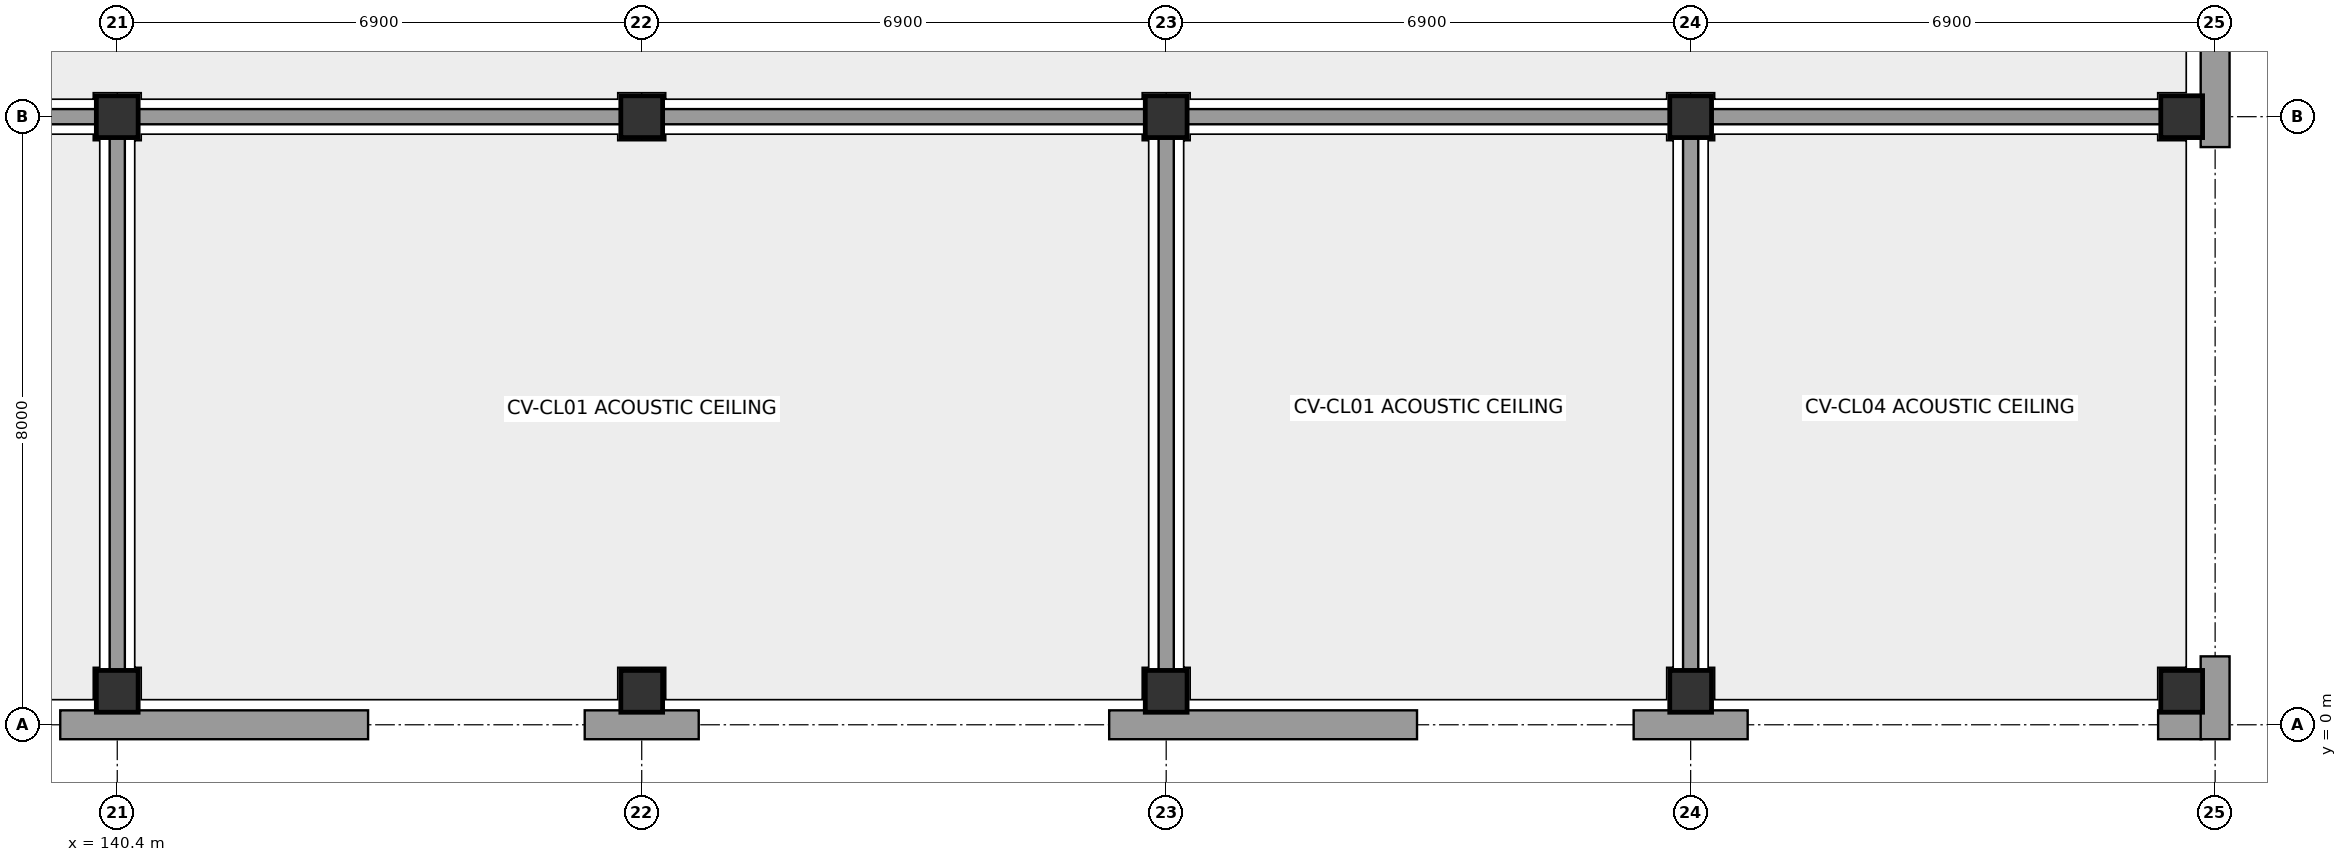
"""IFC4 building model, lengths in metres.
Left out: names, types, materials, properties, quantities, classifications, styles, units other than length and angle.
Written with IfcOpenShell. Run it as: python <this file> out.ifc"""

import sys

from ifc_helpers import new_model, si_unit, direction, frame, frame_2d, origin, origin_with_axes, origin_2d, place, context, subcontext, project, spatial, rectangle, extrude, element, fill, save


model = new_model("IFC4")
c1 = context("Model", 3, precision=1e-05, world=origin(), true_north=direction((0.0, 1.0)))
c2 = subcontext(c1, "Body", "Model", "MODEL_VIEW")
j1 = project(units=[si_unit("LENGTHUNIT", "METRE"), si_unit("PLANEANGLEUNIT", "RADIAN")], contexts=[c1])
p1 = place(None, origin())
s1 = spatial("IfcSite", under=j1, at=p1, CompositionType="ELEMENT")
p2 = place(p1, origin())
s2 = spatial("IfcBuilding", under=s1, at=p2, CompositionType="ELEMENT")
p3 = place(p2, origin())
s3 = spatial("IfcBuildingStorey", under=s2, at=p3, CompositionType="ELEMENT", Elevation=0.0)
for number, where, z_axis, x_axis in (
    (1, (140.4, 0.44, 0.0), (0.0, 0.0, 1.0), (1.0, 0.0, 0.0)),
    (2, (140.4, 8.0, 0.0), (0.0, 0.0, 1.0), (1.0, 0.0, 0.0)),
    (3, (147.3, 0.44, 0.0), (0.0, 0.0, 1.0), (1.0, 0.0, 0.0)),
    (4, (147.3, 8.0, 0.0), (0.0, 0.0, 1.0), (1.0, 0.0, 0.0)),
    (5, (154.2, 0.44, 0.0), (0.0, 0.0, 1.0), (1.0, 0.0, 0.0)),
    (6, (154.2, 8.0, 0.0), (0.0, 0.0, 1.0), (1.0, 0.0, 0.0)),
    (7, (161.1, 0.44, 0.0), (0.0, 0.0, 1.0), (1.0, 0.0, 0.0)),
    (8, (161.1, 8.0, 0.0), (0.0, 0.0, 1.0), (1.0, 0.0, 0.0)),
    (9, (167.56, 0.44, 0.0), (0.0, 0.0, 1.0), (1.0, 0.0, 0.0)),
    (10, (167.56, 8.0, 0.0), (0.0, 0.0, 1.0), (1.0, 0.0, 0.0)),
):
    element("IfcColumn", number, at=place(p3, frame(where, z_axis=z_axis, x_axis=x_axis)), inside=s3, PredefinedType="COLUMN", context=c2, shape_type="SweptSolid", body=[
        extrude(rectangle(XDim=0.55, YDim=0.55, at=origin_2d()), origin(), (0.0, 0.0, 1.0), 4.4),
    ])
p4 = place(p3, frame((139.65, 0.0, 0.0), z_axis=(0.0, 0.0, 1.0), x_axis=(1.0, 0.0, 0.0)))
e11 = element("IfcWall", 11, at=p4, inside=s3, PredefinedType="STANDARD", context=c2, shape_type="SweptSolid", body=[
    extrude(rectangle(XDim=4.05, YDim=0.38, at=frame_2d((2.025, 0.0))), origin(), (0.0, 0.0, 1.0), 4.12),
])
p5 = place(p4, frame((1.9, 0.0, 0.0)))
e12 = element("IfcOpeningElement", 12, at=p5, cuts=e11, PredefinedType="OPENING", context=c2, shape_type="SweptSolid", body=[
    extrude(rectangle(XDim=1.8, YDim=2.4, at=frame_2d((0.9, 1.2))), frame((0.0, 0.202, 0.0), z_axis=(0.0, -1.0, 0.0), x_axis=(1.0, 0.0, 0.0)), (0.0, 0.0, 1.0), 0.404),
])
p6 = place(p3, frame((146.55, 0.0, 0.0), z_axis=(0.0, 0.0, 1.0), x_axis=(1.0, 0.0, 0.0)))
e13 = element("IfcWall", 13, at=p6, inside=s3, PredefinedType="STANDARD", context=c2, shape_type="SweptSolid", body=[
    extrude(rectangle(XDim=1.5, YDim=0.38, at=frame_2d((0.75, 0.0))), origin(), (0.0, 0.0, 1.0), 4.12),
])
p7 = place(p3, frame((153.45, 0.0, 0.0), z_axis=(0.0, 0.0, 1.0), x_axis=(1.0, 0.0, 0.0)))
e14 = element("IfcWall", 14, at=p7, inside=s3, PredefinedType="STANDARD", context=c2, shape_type="SweptSolid", body=[
    extrude(rectangle(XDim=4.05, YDim=0.38, at=frame_2d((2.025, 0.0))), origin(), (0.0, 0.0, 1.0), 4.12),
])
p8 = place(p7, frame((1.9, 0.0, 0.0)))
e15 = element("IfcOpeningElement", 15, at=p8, cuts=e14, PredefinedType="OPENING", context=c2, shape_type="SweptSolid", body=[
    extrude(rectangle(XDim=1.8, YDim=2.4, at=frame_2d((0.9, 1.2))), frame((0.0, 0.202, 0.0), z_axis=(0.0, -1.0, 0.0), x_axis=(1.0, 0.0, 0.0)), (0.0, 0.0, 1.0), 0.404),
])
p9 = place(p3, frame((160.35, 0.0, 0.0), z_axis=(0.0, 0.0, 1.0), x_axis=(1.0, 0.0, 0.0)))
e16 = element("IfcWall", 16, at=p9, inside=s3, PredefinedType="STANDARD", context=c2, shape_type="SweptSolid", body=[
    extrude(rectangle(XDim=1.5, YDim=0.38, at=frame_2d((0.75, 0.0))), origin(), (0.0, 0.0, 1.0), 4.12),
])
p10 = place(p3, frame((167.25, 0.0, 0.0), z_axis=(0.0, 0.0, 1.0), x_axis=(1.0, 0.0, 0.0)))
e17 = element("IfcWall", 17, at=p10, inside=s3, PredefinedType="STANDARD", context=c2, shape_type="SweptSolid", body=[
    extrude(rectangle(XDim=0.57, YDim=0.38, at=frame_2d((0.285, 0.0))), origin(), (0.0, 0.0, 1.0), 4.12),
])
p11 = place(p3, frame((168.0, -0.19, 0.0), z_axis=(0.0, 0.0, 1.0), x_axis=(0.0, 1.0, 0.0)))
e18 = element("IfcWall", 18, at=p11, inside=s3, PredefinedType="STANDARD", context=c2, shape_type="SweptSolid", body=[
    extrude(rectangle(XDim=1.09, YDim=0.38, at=frame_2d((0.545, 0.0))), origin(), (0.0, 0.0, 1.0), 4.12),
])
p12 = place(p3, frame((168.0, 7.6, 0.0), z_axis=(0.0, 0.0, 1.0), x_axis=(0.0, 1.0, 0.0)))
e19 = element("IfcWall", 19, at=p12, inside=s3, PredefinedType="STANDARD", context=c2, shape_type="SweptSolid", body=[
    extrude(rectangle(XDim=3.2, YDim=0.38, at=frame_2d((1.6, 0.0))), origin(), (0.0, 0.0, 1.0), 4.12),
])
p13 = place(p3, frame((126.75, 8.0, 0.0), z_axis=(0.0, 0.0, 1.0), x_axis=(1.0, 0.0, 0.0)))
e20 = element("IfcWall", 20, at=p13, inside=s3, PredefinedType="PARTITIONING", context=c2, shape_type="SweptSolid", body=[
    extrude(rectangle(XDim=13.5, YDim=0.2, at=frame_2d((6.75, 0.0))), origin(), (0.0, 0.0, 1.0), 3.56),
])
p14 = place(p13, frame((2.0, 0.0, 0.0)))
e21 = element("IfcOpeningElement", 21, at=p14, cuts=e20, PredefinedType="OPENING", context=c2, shape_type="SweptSolid", body=[
    extrude(rectangle(XDim=1.0, YDim=2.15, at=frame_2d((0.5, 1.075))), frame((0.0, 0.112, 0.0), z_axis=(0.0, -1.0, 0.0), x_axis=(1.0, 0.0, 0.0)), (0.0, 0.0, 1.0), 0.224),
])
p15 = place(p3, frame((140.4, 0.25, 0.0), z_axis=(0.0, 0.0, 1.0), x_axis=(0.0, 1.0, 0.0)))
e22 = element("IfcWall", 22, at=p15, inside=s3, PredefinedType="PARTITIONING", context=c2, shape_type="SweptSolid", body=[
    extrude(rectangle(XDim=7.6, YDim=0.2, at=frame_2d((3.8, 0.0))), origin(), (0.0, 0.0, 1.0), 4.12),
])
p16 = place(p3, frame((140.55, 8.0, 0.0), z_axis=(0.0, 0.0, 1.0), x_axis=(1.0, 0.0, 0.0)))
e23 = element("IfcWall", 23, at=p16, inside=s3, PredefinedType="PARTITIONING", context=c2, shape_type="SweptSolid", body=[
    extrude(rectangle(XDim=13.5, YDim=0.2, at=frame_2d((6.75, 0.0))), origin(), (0.0, 0.0, 1.0), 3.56),
])
p17 = place(p16, frame((2.0, 0.0, 0.0)))
e24 = element("IfcOpeningElement", 24, at=p17, cuts=e23, PredefinedType="OPENING", context=c2, shape_type="SweptSolid", body=[
    extrude(rectangle(XDim=1.0, YDim=2.15, at=frame_2d((0.5, 1.075))), frame((0.0, 0.112, 0.0), z_axis=(0.0, -1.0, 0.0), x_axis=(1.0, 0.0, 0.0)), (0.0, 0.0, 1.0), 0.224),
])
p18 = place(p3, frame((154.2, 0.25, 0.0), z_axis=(0.0, 0.0, 1.0), x_axis=(0.0, 1.0, 0.0)))
e25 = element("IfcWall", 25, at=p18, inside=s3, PredefinedType="PARTITIONING", context=c2, shape_type="SweptSolid", body=[
    extrude(rectangle(XDim=7.6, YDim=0.2, at=frame_2d((3.8, 0.0))), origin(), (0.0, 0.0, 1.0), 4.12),
])
p19 = place(p3, frame((154.35, 8.0, 0.0), z_axis=(0.0, 0.0, 1.0), x_axis=(1.0, 0.0, 0.0)))
e26 = element("IfcWall", 26, at=p19, inside=s3, PredefinedType="PARTITIONING", context=c2, shape_type="SweptSolid", body=[
    extrude(rectangle(XDim=6.6, YDim=0.2, at=frame_2d((3.3, 0.0))), origin(), (0.0, 0.0, 1.0), 3.56),
])
p20 = place(p19, frame((2.0, 0.0, 0.0)))
e27 = element("IfcOpeningElement", 27, at=p20, cuts=e26, PredefinedType="OPENING", context=c2, shape_type="SweptSolid", body=[
    extrude(rectangle(XDim=1.0, YDim=2.15, at=frame_2d((0.5, 1.075))), frame((0.0, 0.112, 0.0), z_axis=(0.0, -1.0, 0.0), x_axis=(1.0, 0.0, 0.0)), (0.0, 0.0, 1.0), 0.224),
])
p21 = place(p3, frame((161.1, 0.25, 0.0), z_axis=(0.0, 0.0, 1.0), x_axis=(0.0, 1.0, 0.0)))
e28 = element("IfcWall", 28, at=p21, inside=s3, PredefinedType="PARTITIONING", context=c2, shape_type="SweptSolid", body=[
    extrude(rectangle(XDim=7.6, YDim=0.2, at=frame_2d((3.8, 0.0))), origin(), (0.0, 0.0, 1.0), 3.56),
])
p22 = place(p3, frame((161.25, 8.0, 0.0), z_axis=(0.0, 0.0, 1.0), x_axis=(1.0, 0.0, 0.0)))
e29 = element("IfcWall", 29, at=p22, inside=s3, PredefinedType="PARTITIONING", context=c2, shape_type="SweptSolid", body=[
    extrude(rectangle(XDim=6.45, YDim=0.2, at=frame_2d((3.225, 0.0))), origin(), (0.0, 0.0, 1.0), 3.56),
])
p23 = place(p22, frame((2.0, 0.0, 0.0)))
e30 = element("IfcOpeningElement", 30, at=p23, cuts=e29, PredefinedType="OPENING", context=c2, shape_type="SweptSolid", body=[
    extrude(rectangle(XDim=1.0, YDim=2.15, at=frame_2d((0.5, 1.075))), frame((0.0, 0.112, 0.0), z_axis=(0.0, -1.0, 0.0), x_axis=(1.0, 0.0, 0.0)), (0.0, 0.0, 1.0), 0.224),
])
p24 = place(p5, frame((1.8, 0.0, 0.0), z_axis=(0.0, 0.0, 1.0), x_axis=(-1.0, 0.0, 0.0)))
e31 = element("IfcDoor", 31, at=p24, inside=s3, OperationType="DOUBLE_DOOR_SINGLE_SWING", PredefinedType="DOOR", context=c2, shape_type="SweptSolid", body=[
    extrude(rectangle(XDim=1.8, YDim=2.4, at=frame_2d((0.9, 1.2))), frame((0.0, 0.025, 0.0), z_axis=(0.0, -1.0, 0.0), x_axis=(1.0, 0.0, 0.0)), (0.0, 0.0, 1.0), 0.05),
])
fill(e12, e31)
p25 = place(p8, frame((1.8, 0.0, 0.0), z_axis=(0.0, 0.0, 1.0), x_axis=(-1.0, 0.0, 0.0)))
e32 = element("IfcDoor", 32, at=p25, inside=s3, OperationType="DOUBLE_DOOR_SINGLE_SWING", PredefinedType="DOOR", context=c2, shape_type="SweptSolid", body=[
    extrude(rectangle(XDim=1.8, YDim=2.4, at=frame_2d((0.9, 1.2))), frame((0.0, 0.025, 0.0), z_axis=(0.0, -1.0, 0.0), x_axis=(1.0, 0.0, 0.0)), (0.0, 0.0, 1.0), 0.05),
])
fill(e15, e32)
p26 = place(p17, frame((1.0, 0.0, 0.0), z_axis=(0.0, 0.0, 1.0), x_axis=(-1.0, 0.0, 0.0)))
e33 = element("IfcDoor", 33, at=p26, inside=s3, OperationType="SINGLE_SWING_LEFT", PredefinedType="DOOR", context=c2, shape_type="SweptSolid", body=[
    extrude(rectangle(XDim=1.0, YDim=2.15, at=frame_2d((0.5, 1.075))), frame((0.0, 0.025, 0.0), z_axis=(0.0, -1.0, 0.0), x_axis=(1.0, 0.0, 0.0)), (0.0, 0.0, 1.0), 0.05),
])
fill(e24, e33)
p27 = place(p20, origin_with_axes())
e34 = element("IfcDoor", 34, at=p27, inside=s3, OperationType="SINGLE_SWING_RIGHT", PredefinedType="DOOR", context=c2, shape_type="SweptSolid", body=[
    extrude(rectangle(XDim=1.0, YDim=2.15, at=frame_2d((0.5, 1.075))), frame((0.0, 0.025, 0.0), z_axis=(0.0, -1.0, 0.0), x_axis=(1.0, 0.0, 0.0)), (0.0, 0.0, 1.0), 0.05),
])
fill(e27, e34)
p28 = place(p23, frame((1.0, 0.0, 0.0), z_axis=(0.0, 0.0, 1.0), x_axis=(-1.0, 0.0, 0.0)))
e35 = element("IfcDoor", 35, at=p28, inside=s3, OperationType="SINGLE_SWING_LEFT", PredefinedType="DOOR", context=c2, shape_type="SweptSolid", body=[
    extrude(rectangle(XDim=1.0, YDim=2.15, at=frame_2d((0.5, 1.075))), frame((0.0, 0.025, 0.0), z_axis=(0.0, -1.0, 0.0), x_axis=(1.0, 0.0, 0.0)), (0.0, 0.0, 1.0), 0.05),
])
fill(e30, e35)
save(model, sys.argv[1])
